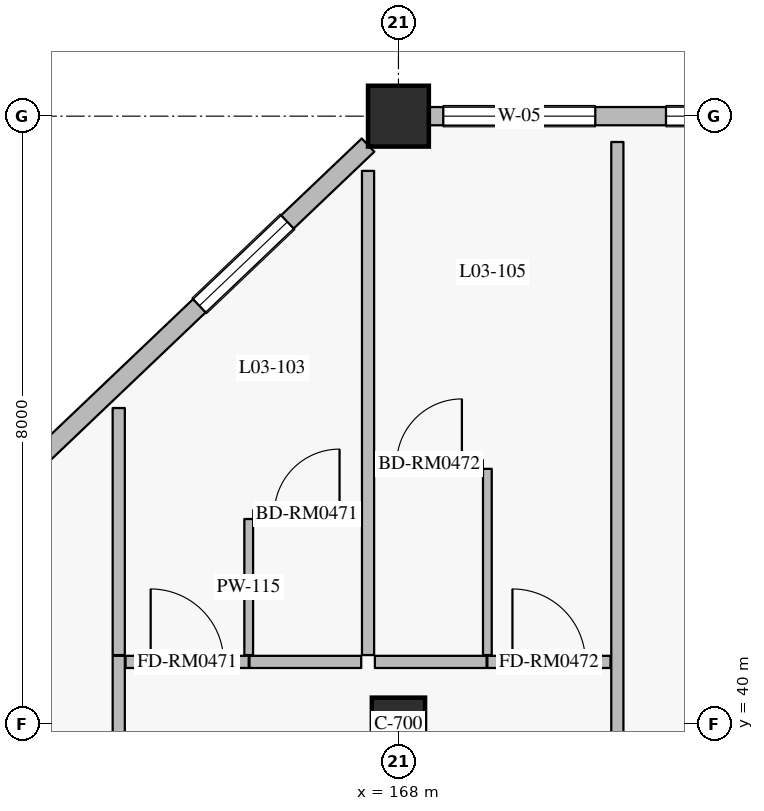
"""IFC4 building model, lengths in metres.
Left out: names, types, materials, properties, quantities, classifications, styles, units other than length and angle.
Written with IfcOpenShell. Run it as: python <this file> out.ifc"""

import sys

from ifc_helpers import new_model, si_unit, direction, frame, frame_2d, origin, origin_2d, place, context, subcontext, project, spatial, rectangle, extrude, element, fill, save


model = new_model("IFC4")
c1 = context("Model", 3, precision=1e-05, world=origin(), true_north=direction((0.0, 1.0)))
c2 = subcontext(c1, "Body", "Model", "MODEL_VIEW")
j1 = project(units=[si_unit("LENGTHUNIT", "METRE"), si_unit("PLANEANGLEUNIT", "RADIAN")], contexts=[c1])
p1 = place(None, origin())
s1 = spatial("IfcSite", under=j1, at=p1, CompositionType="ELEMENT")
p2 = place(p1, origin())
s2 = spatial("IfcBuilding", under=s1, at=p2, CompositionType="ELEMENT")
p3 = place(p2, frame((0.0, 0.0, 16.2)))
s3 = spatial("IfcBuildingStorey", under=s2, at=p3, CompositionType="ELEMENT", Elevation=16.2)
p4 = place(p3, frame((168.0, 48.0, 0.0), z_axis=(0.0, 0.0, 1.0), x_axis=(1.0, 0.0, 0.0)))
e1 = element("IfcColumn", 1, at=p4, inside=s3, PredefinedType="COLUMN", context=c2, shape_type="SweptSolid", body=[
    extrude(rectangle(XDim=0.8, YDim=0.8, at=origin_2d()), origin(), (0.0, 0.0, 1.0), 4.8),
])
p5 = place(p3, frame((168.0, 40.0, 0.0), z_axis=(0.0, 0.0, 1.0), x_axis=(1.0, 0.0, 0.0)))
e2 = element("IfcColumn", 2, at=p5, inside=s3, PredefinedType="COLUMN", context=c2, shape_type="SweptSolid", body=[
    extrude(rectangle(XDim=0.7, YDim=0.7, at=origin_2d()), origin(), (0.0, 0.0, 1.0), 4.8),
])
p6 = place(p3, frame((160.0, 40.381, 0.0), z_axis=(0.0, 0.0, 1.0), x_axis=(0.724156739794, 0.689635422677, 0.0)))
e3 = element("IfcWall", 3, at=p6, inside=s3, PredefinedType="SOLIDWALL", context=c2, shape_type="SweptSolid", body=[
    extrude(rectangle(XDim=10.495, YDim=0.24, at=frame_2d((5.248, 0.0))), origin(), (0.0, 0.0, 1.0), 4.13),
])
p7 = place(p6, frame((2.901, 0.0, 0.8)))
e4 = element("IfcOpeningElement", 4, at=p7, cuts=e3, PredefinedType="OPENING", context=c2, shape_type="SweptSolid", body=[
    extrude(rectangle(XDim=1.6, YDim=1.6, at=frame_2d((0.8, 0.8))), frame((0.0, 0.13, 0.0), z_axis=(0.0, -1.0, 0.0), x_axis=(1.0, 0.0, 0.0)), (0.0, 0.0, 1.0), 0.26),
])
p8 = place(p6, frame((7.43, 0.0, 0.8)))
e5 = element("IfcOpeningElement", 5, at=p8, cuts=e3, PredefinedType="OPENING", context=c2, shape_type="SweptSolid", body=[
    extrude(rectangle(XDim=1.6, YDim=1.6, at=frame_2d((0.8, 0.8))), frame((0.0, 0.13, 0.0), z_axis=(0.0, -1.0, 0.0), x_axis=(1.0, 0.0, 0.0)), (0.0, 0.0, 1.0), 0.26),
])
p9 = place(p3, frame((168.4, 48.0, 0.0), z_axis=(0.0, 0.0, 1.0), x_axis=(1.0, 0.0, 0.0)))
e6 = element("IfcWall", 6, at=p9, inside=s3, PredefinedType="SOLIDWALL", context=c2, shape_type="SweptSolid", body=[
    extrude(rectangle(XDim=7.6, YDim=0.24, at=frame_2d((3.8, 0.0))), origin(), (0.0, 0.0, 1.0), 4.13),
])
p10 = place(p9, frame((0.19, 0.0, 0.8)))
e7 = element("IfcOpeningElement", 7, at=p10, cuts=e6, PredefinedType="OPENING", context=c2, shape_type="SweptSolid", body=[
    extrude(rectangle(XDim=2.0, YDim=1.75, at=frame_2d((1.0, 0.875))), frame((0.0, 0.13, 0.0), z_axis=(0.0, -1.0, 0.0), x_axis=(1.0, 0.0, 0.0)), (0.0, 0.0, 1.0), 0.26),
])
p11 = place(p9, frame((3.12, 0.0, 0.8)))
e8 = element("IfcOpeningElement", 8, at=p11, cuts=e6, PredefinedType="OPENING", context=c2, shape_type="SweptSolid", body=[
    extrude(rectangle(XDim=2.0, YDim=1.75, at=frame_2d((1.0, 0.875))), frame((0.0, 0.13, 0.0), z_axis=(0.0, -1.0, 0.0), x_axis=(1.0, 0.0, 0.0)), (0.0, 0.0, 1.0), 0.26),
])
p12 = place(p9, frame((6.03, 0.0, 0.8)))
e9 = element("IfcOpeningElement", 9, at=p12, cuts=e6, PredefinedType="OPENING", context=c2, shape_type="SweptSolid", body=[
    extrude(rectangle(XDim=1.4, YDim=1.6, at=frame_2d((0.7, 0.8))), frame((0.0, 0.13, 0.0), z_axis=(0.0, -1.0, 0.0), x_axis=(1.0, 0.0, 0.0)), (0.0, 0.0, 1.0), 0.26),
])
p13 = place(p3, frame((164.32, 32.26, 0.0), z_axis=(0.0, 0.0, 1.0), x_axis=(0.0, 1.0, 0.0)))
e10 = element("IfcWall", 10, at=p13, inside=s3, PredefinedType="PARTITIONING", context=c2, shape_type="SweptSolid", body=[
    extrude(rectangle(XDim=8.64, YDim=0.16, at=frame_2d((4.32, 0.0))), origin(), (0.0, 0.0, 1.0), 4.535),
])
p14 = place(p3, frame((164.41, 40.82, 0.0), z_axis=(0.0, 0.0, 1.0), x_axis=(1.0, 0.0, 0.0)))
e11 = element("IfcWall", 11, at=p14, inside=s3, PredefinedType="PARTITIONING", context=c2, shape_type="SweptSolid", body=[
    extrude(rectangle(XDim=1.62, YDim=0.16, at=frame_2d((0.81, 0.0))), origin(), (0.0, 0.0, 1.0), 4.535),
])
p15 = place(p14, frame((0.33, 0.0, 0.0)))
e12 = element("IfcOpeningElement", 12, at=p15, cuts=e11, PredefinedType="OPENING", context=c2, shape_type="SweptSolid", body=[
    extrude(rectangle(XDim=0.96, YDim=2.2, at=frame_2d((0.48, 1.1))), frame((0.0, 0.09, 0.0), z_axis=(0.0, -1.0, 0.0), x_axis=(1.0, 0.0, 0.0)), (0.0, 0.0, 1.0), 0.18),
])
p16 = place(p3, frame((166.04, 40.82, 0.0), z_axis=(0.0, 0.0, 1.0), x_axis=(1.0, 0.0, 0.0)))
e13 = element("IfcWall", 13, at=p16, inside=s3, PredefinedType="PARTITIONING", context=c2, shape_type="SweptSolid", body=[
    extrude(rectangle(XDim=1.47, YDim=0.16, at=frame_2d((0.735, 0.0))), origin(), (0.0, 0.0, 1.0), 4.535),
])
p17 = place(p3, frame((166.03, 40.91, 0.0), z_axis=(0.0, 0.0, 1.0), x_axis=(0.0, 1.0, 0.0)))
e14 = element("IfcWall", 14, at=p17, inside=s3, PredefinedType="PARTITIONING", context=c2, shape_type="SweptSolid", body=[
    extrude(rectangle(XDim=1.79, YDim=0.115, at=frame_2d((0.895, 0.0))), origin(), (0.0, 0.0, 1.0), 4.535),
])
p18 = place(p3, frame((166.09, 42.76, 0.0), z_axis=(0.0, 0.0, 1.0), x_axis=(1.0, 0.0, 0.0)))
e15 = element("IfcWall", 15, at=p18, inside=s3, PredefinedType="PARTITIONING", context=c2, shape_type="SweptSolid", body=[
    extrude(rectangle(XDim=1.41, YDim=0.115, at=frame_2d((0.705, 0.0))), origin(), (0.0, 0.0, 1.0), 4.535),
])
p19 = place(p18, frame((0.275, 0.0, 0.0)))
e16 = element("IfcOpeningElement", 16, at=p19, cuts=e15, PredefinedType="OPENING", context=c2, shape_type="SweptSolid", body=[
    extrude(rectangle(XDim=0.86, YDim=2.12, at=frame_2d((0.43, 1.06))), frame((0.0, 0.067, 0.0), z_axis=(0.0, -1.0, 0.0), x_axis=(1.0, 0.0, 0.0)), (0.0, 0.0, 1.0), 0.135),
])
p20 = place(p3, frame((164.32, 40.91, 0.0), z_axis=(0.0, 0.0, 1.0), x_axis=(0.0, 1.0, 0.0)))
e17 = element("IfcWall", 17, at=p20, inside=s3, PredefinedType="PARTITIONING", context=c2, shape_type="SweptSolid", body=[
    extrude(rectangle(XDim=3.25, YDim=0.16, at=frame_2d((1.625, 0.0))), origin(), (0.0, 0.0, 1.0), 4.535),
])
p21 = place(p3, frame((167.69, 40.82, 0.0), z_axis=(0.0, 0.0, 1.0), x_axis=(1.0, 0.0, 0.0)))
e18 = element("IfcWall", 18, at=p21, inside=s3, PredefinedType="PARTITIONING", context=c2, shape_type="SweptSolid", body=[
    extrude(rectangle(XDim=1.47, YDim=0.16, at=frame_2d((0.735, 0.0))), origin(), (0.0, 0.0, 1.0), 4.535),
])
p22 = place(p3, frame((169.17, 40.82, 0.0), z_axis=(0.0, 0.0, 1.0), x_axis=(1.0, 0.0, 0.0)))
e19 = element("IfcWall", 19, at=p22, inside=s3, PredefinedType="PARTITIONING", context=c2, shape_type="SweptSolid", body=[
    extrude(rectangle(XDim=1.62, YDim=0.16, at=frame_2d((0.81, 0.0))), origin(), (0.0, 0.0, 1.0), 4.535),
])
p23 = place(p22, frame((0.33, 0.0, 0.0)))
e20 = element("IfcOpeningElement", 20, at=p23, cuts=e19, PredefinedType="OPENING", context=c2, shape_type="SweptSolid", body=[
    extrude(rectangle(XDim=0.96, YDim=2.2, at=frame_2d((0.48, 1.1))), frame((0.0, 0.09, 0.0), z_axis=(0.0, -1.0, 0.0), x_axis=(1.0, 0.0, 0.0)), (0.0, 0.0, 1.0), 0.18),
])
p24 = place(p3, frame((169.17, 40.91, 0.0), z_axis=(0.0, 0.0, 1.0), x_axis=(0.0, 1.0, 0.0)))
e21 = element("IfcWall", 21, at=p24, inside=s3, PredefinedType="PARTITIONING", context=c2, shape_type="SweptSolid", body=[
    extrude(rectangle(XDim=2.45, YDim=0.115, at=frame_2d((1.225, 0.0))), origin(), (0.0, 0.0, 1.0), 4.535),
])
p25 = place(p3, frame((167.7, 43.42, 0.0), z_axis=(0.0, 0.0, 1.0), x_axis=(1.0, 0.0, 0.0)))
e22 = element("IfcWall", 22, at=p25, inside=s3, PredefinedType="PARTITIONING", context=c2, shape_type="SweptSolid", body=[
    extrude(rectangle(XDim=1.41, YDim=0.115, at=frame_2d((0.705, 0.0))), origin(), (0.0, 0.0, 1.0), 4.535),
])
p26 = place(p25, frame((0.275, 0.0, 0.0)))
e23 = element("IfcOpeningElement", 23, at=p26, cuts=e22, PredefinedType="OPENING", context=c2, shape_type="SweptSolid", body=[
    extrude(rectangle(XDim=0.86, YDim=2.12, at=frame_2d((0.43, 1.06))), frame((0.0, 0.067, 0.0), z_axis=(0.0, -1.0, 0.0), x_axis=(1.0, 0.0, 0.0)), (0.0, 0.0, 1.0), 0.135),
])
p27 = place(p3, frame((167.6, 40.91, 0.0), z_axis=(0.0, 0.0, 1.0), x_axis=(0.0, 1.0, 0.0)))
e24 = element("IfcWall", 24, at=p27, inside=s3, PredefinedType="PARTITIONING", context=c2, shape_type="SweptSolid", body=[
    extrude(rectangle(XDim=6.37, YDim=0.16, at=frame_2d((3.185, 0.0))), origin(), (0.0, 0.0, 1.0), 4.535),
])
p28 = place(p3, frame((170.88, 38.75, 0.0), z_axis=(0.0, 0.0, 1.0), x_axis=(0.0, 1.0, 0.0)))
e25 = element("IfcWall", 25, at=p28, inside=s3, PredefinedType="PARTITIONING", context=c2, shape_type="SweptSolid", body=[
    extrude(rectangle(XDim=8.91, YDim=0.16, at=frame_2d((4.455, 0.0))), origin(), (0.0, 0.0, 1.0), 4.535),
])
p29 = place(p8, origin())
e26 = element("IfcWindow", 26, at=p29, inside=s3, PartitioningType="SINGLE_PANEL", PredefinedType="WINDOW", context=c2, shape_type="SweptSolid", body=[
    extrude(rectangle(XDim=1.6, YDim=1.6, at=frame_2d((0.8, 0.8))), frame((0.0, 0.03, 0.0), z_axis=(0.0, -1.0, 0.0), x_axis=(1.0, 0.0, 0.0)), (0.0, 0.0, 1.0), 0.06),
])
fill(e5, e26)
p30 = place(p10, origin())
e27 = element("IfcWindow", 27, at=p30, inside=s3, PartitioningType="DOUBLE_PANEL_VERTICAL", PredefinedType="WINDOW", context=c2, shape_type="SweptSolid", body=[
    extrude(rectangle(XDim=2.0, YDim=1.75, at=frame_2d((1.0, 0.875))), frame((0.0, 0.03, 0.0), z_axis=(0.0, -1.0, 0.0), x_axis=(1.0, 0.0, 0.0)), (0.0, 0.0, 1.0), 0.06),
])
fill(e7, e27)
p31 = place(p11, origin())
e28 = element("IfcWindow", 28, at=p31, inside=s3, PartitioningType="DOUBLE_PANEL_VERTICAL", PredefinedType="WINDOW", context=c2, shape_type="SweptSolid", body=[
    extrude(rectangle(XDim=2.0, YDim=1.75, at=frame_2d((1.0, 0.875))), frame((0.0, 0.03, 0.0), z_axis=(0.0, -1.0, 0.0), x_axis=(1.0, 0.0, 0.0)), (0.0, 0.0, 1.0), 0.06),
])
fill(e8, e28)
p32 = place(p15, origin())
e29 = element("IfcDoor", 29, at=p32, inside=s3, OperationType="SINGLE_SWING_LEFT", PredefinedType="DOOR", context=c2, shape_type="SweptSolid", body=[
    extrude(rectangle(XDim=0.96, YDim=2.2, at=frame_2d((0.48, 1.1))), frame((0.0, 0.025, 0.0), z_axis=(0.0, -1.0, 0.0), x_axis=(1.0, 0.0, 0.0)), (0.0, 0.0, 1.0), 0.05),
])
fill(e12, e29)
p33 = place(p19, origin())
e30 = element("IfcDoor", 30, at=p33, inside=s3, OperationType="SINGLE_SWING_RIGHT", PredefinedType="DOOR", context=c2, shape_type="SweptSolid", body=[
    extrude(rectangle(XDim=0.86, YDim=2.12, at=frame_2d((0.43, 1.06))), frame((0.0, 0.025, 0.0), z_axis=(0.0, -1.0, 0.0), x_axis=(1.0, 0.0, 0.0)), (0.0, 0.0, 1.0), 0.05),
])
fill(e16, e30)
p34 = place(p23, origin())
e31 = element("IfcDoor", 31, at=p34, inside=s3, OperationType="SINGLE_SWING_LEFT", PredefinedType="DOOR", context=c2, shape_type="SweptSolid", body=[
    extrude(rectangle(XDim=0.96, YDim=2.2, at=frame_2d((0.48, 1.1))), frame((0.0, 0.025, 0.0), z_axis=(0.0, -1.0, 0.0), x_axis=(1.0, 0.0, 0.0)), (0.0, 0.0, 1.0), 0.05),
])
fill(e20, e31)
p35 = place(p26, origin())
e32 = element("IfcDoor", 32, at=p35, inside=s3, OperationType="SINGLE_SWING_RIGHT", PredefinedType="DOOR", context=c2, shape_type="SweptSolid", body=[
    extrude(rectangle(XDim=0.86, YDim=2.12, at=frame_2d((0.43, 1.06))), frame((0.0, 0.025, 0.0), z_axis=(0.0, -1.0, 0.0), x_axis=(1.0, 0.0, 0.0)), (0.0, 0.0, 1.0), 0.05),
])
fill(e23, e32)
save(model, sys.argv[1])
